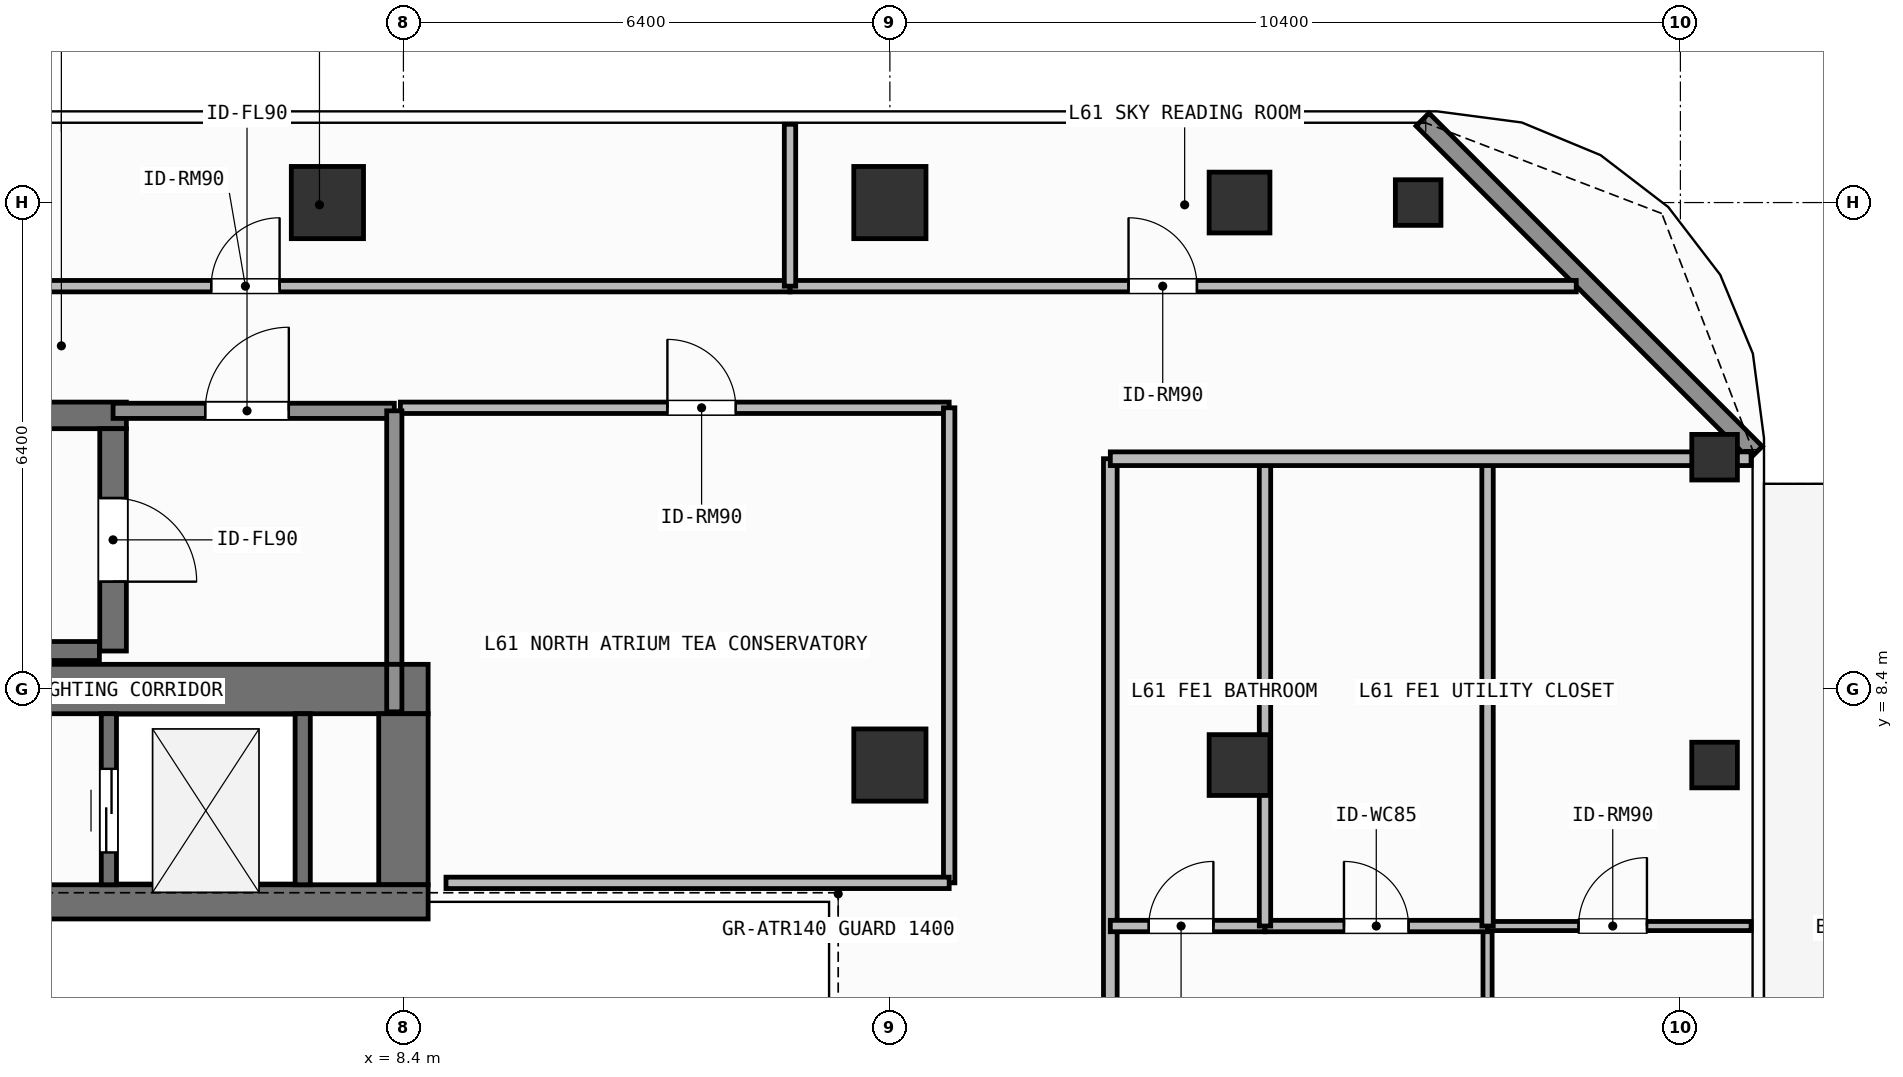
"""IFC4 building model, lengths in metres.
Left out: names, types, materials, properties, quantities, classifications, styles, units other than length and angle.
Written with IfcOpenShell. Run it as: python <this file> out.ifc"""

import sys

from ifc_helpers import new_model, si_unit, direction, frame, frame_2d, origin, origin_2d, place, context, subcontext, project, spatial, rectangle, hollow_rectangle, extrude, element, fill, save


model = new_model("IFC4")
c1 = context("Model", 3, precision=1e-05, world=origin(), true_north=direction((0.0, 1.0)))
c2 = subcontext(c1, "Body", "Model", "MODEL_VIEW")
j1 = project(units=[si_unit("LENGTHUNIT", "METRE"), si_unit("PLANEANGLEUNIT", "RADIAN")], contexts=[c1])
p1 = place(None, origin())
s1 = spatial("IfcSite", under=j1, at=p1, CompositionType="ELEMENT")
p2 = place(p1, origin())
s2 = spatial("IfcBuilding", under=s1, at=p2, CompositionType="ELEMENT")
p3 = place(p2, frame((0.0, 0.0, 250.8)))
s3 = spatial("IfcBuildingStorey", under=s2, at=p3, CompositionType="ELEMENT", Elevation=250.8)
p4 = place(p3, frame((-7.55, 8.4, 0.0), z_axis=(0.0, 0.0, 1.0), x_axis=(1.0, 0.0, 0.0)))
e1 = element("IfcWall", 1, at=p4, inside=s3, PredefinedType="SHEAR", context=c2, shape_type="SweptSolid", body=[
    extrude(rectangle(XDim=16.275, YDim=0.65, at=frame_2d((8.138, 0.0))), origin(), (0.0, 0.0, 1.0), 3.9),
])
p5 = place(p3, frame((8.4, 5.825, 0.0), z_axis=(0.0, 0.0, 1.0), x_axis=(0.0, 1.0, 0.0)))
e2 = element("IfcWall", 2, at=p5, inside=s3, PredefinedType="SHEAR", context=c2, shape_type="SweptSolid", body=[
    extrude(rectangle(XDim=2.25, YDim=0.65, at=frame_2d((1.125, 0.0))), origin(), (0.0, 0.0, 1.0), 3.9),
])
p6 = place(p3, frame((3.045, 5.6, 0.0), z_axis=(0.0, 0.0, 1.0), x_axis=(1.0, 0.0, 0.0)))
e3 = element("IfcWall", 3, at=p6, inside=s3, PredefinedType="SHEAR", context=c2, shape_type="SweptSolid", body=[
    extrude(rectangle(XDim=5.68, YDim=0.45, at=frame_2d((2.84, 0.0))), origin(), (0.0, 0.0, 1.0), 3.9),
])
p7 = place(p3, frame((-2.555, 12.0, 0.0), z_axis=(0.0, 0.0, 1.0), x_axis=(1.0, 0.0, 0.0)))
e4 = element("IfcWall", 4, at=p7, inside=s3, PredefinedType="SHEAR", context=c2, shape_type="SweptSolid", body=[
    extrude(rectangle(XDim=7.31, YDim=0.35, at=frame_2d((3.655, 0.0))), origin(), (0.0, 0.0, 1.0), 3.9),
])
p8 = place(p3, frame((-2.2, 8.9, 0.0), z_axis=(0.0, 0.0, 1.0), x_axis=(1.0, 0.0, 0.0)))
e5 = element("IfcWall", 5, at=p8, inside=s3, PredefinedType="SHEAR", context=c2, shape_type="SweptSolid", body=[
    extrude(rectangle(XDim=6.6, YDim=0.25, at=frame_2d((3.3, 0.0))), origin(), (0.0, 0.0, 1.0), 3.9),
])
p9 = place(p3, frame((4.58, 11.825, 0.0), z_axis=(0.0, 0.0, 1.0), x_axis=(0.0, -1.0, 0.0)))
e6 = element("IfcWall", 6, at=p9, inside=s3, PredefinedType="SHEAR", context=c2, shape_type="SweptSolid", body=[
    extrude(rectangle(XDim=2.925, YDim=0.35, at=frame_2d((1.462, 0.0))), origin(), (0.0, 0.0, 1.0), 3.9),
])
p10 = place(p9, frame((0.913, 0.0, 0.0)))
e7 = element("IfcOpeningElement", 7, at=p10, cuts=e6, PredefinedType="OPENING", context=c2, shape_type="SweptSolid", body=[
    extrude(rectangle(XDim=1.1, YDim=2.15, at=frame_2d((0.55, 1.075))), frame((0.0, 0.185, 0.0), z_axis=(0.0, -1.0, 0.0), x_axis=(1.0, 0.0, 0.0)), (0.0, 0.0, 1.0), 0.37),
])
for number, where, z_axis, x_axis in (
    (8, (7.4, 14.8, 0.0), (0.0, 0.0, 1.0), (1.0, 0.0, 0.0)),
    (9, (14.8, 14.8, 0.0), (0.0, 0.0, 1.0), (1.0, 0.0, 0.0)),
    (10, (14.8, 7.4, 0.0), (0.0, 0.0, 1.0), (1.0, 0.0, 0.0)),
):
    element("IfcColumn", number, at=place(p3, frame(where, z_axis=z_axis, x_axis=x_axis)), inside=s3, PredefinedType="COLUMN", context=c2, shape_type="SweptSolid", body=[
        extrude(rectangle(XDim=0.95, YDim=0.95, at=origin_2d()), origin(), (0.0, 0.0, 1.0), 3.9),
    ])
for number, where, z_axis, x_axis in (
    (11, (19.4, 7.4, 0.0), (0.0, 0.0, 1.0), (1.0, 0.0, 0.0)),
    (12, (19.4, 14.8, 0.0), (0.0, 0.0, 1.0), (1.0, 0.0, 0.0)),
):
    element("IfcColumn", number, at=place(p3, frame(where, z_axis=z_axis, x_axis=x_axis)), inside=s3, PredefinedType="COLUMN", context=c2, shape_type="SweptSolid", body=[
        extrude(hollow_rectangle(XDim=0.8, YDim=0.8, WallThickness=0.036, at=origin_2d()), origin(), (0.0, 0.0, 1.0), 3.9),
    ])
for number, where, z_axis, x_axis in (
    (13, (21.75, 14.8, 0.0), (0.0, 0.0, 1.0), (1.0, 0.0, 0.0)),
    (14, (25.65, 11.45, 0.0), (0.0, 0.0, 1.0), (1.0, 0.0, 0.0)),
    (15, (25.65, 7.4, 0.0), (0.0, 0.0, 1.0), (1.0, 0.0, 0.0)),
):
    element("IfcColumn", number, at=place(p3, frame(where, z_axis=z_axis, x_axis=x_axis)), inside=s3, PredefinedType="COLUMN", context=c2, shape_type="SweptSolid", body=[
        extrude(hollow_rectangle(XDim=0.6, YDim=0.6, WallThickness=0.028, at=origin_2d()), origin(), (0.0, 0.0, 1.0), 3.9),
    ])
p11 = place(p3, frame((21.808, 15.892, 0.0), z_axis=(0.0, 0.0, 1.0), x_axis=(0.707106781187, -0.707106781187, 0.0)))
e16 = element("IfcWall", 16, at=p11, inside=s3, PredefinedType="SOLIDWALL", context=c2, shape_type="SweptSolid", body=[
    extrude(rectangle(XDim=6.201, YDim=0.24, at=frame_2d((3.101, 0.0))), origin(), (0.0, 0.0, 1.0), 3.62),
])
p12 = place(p3, frame((4.525, 5.825, 0.0), z_axis=(0.0, 0.0, 1.0), x_axis=(0.0, 1.0, 0.0)))
e17 = element("IfcWall", 17, at=p12, inside=s3, PredefinedType="SHEAR", context=c2, shape_type="SweptSolid", body=[
    extrude(rectangle(XDim=2.25, YDim=0.2, at=frame_2d((1.125, 0.0))), origin(), (0.0, 0.0, 1.0), 3.62),
])
p13 = place(p12, frame((0.425, 0.0, 0.0)))
e18 = element("IfcOpeningElement", 18, at=p13, cuts=e17, PredefinedType="OPENING", context=c2, shape_type="SweptSolid", body=[
    extrude(rectangle(XDim=1.1, YDim=2.2, at=frame_2d((0.55, 1.1))), frame((0.0, 0.11, 0.0), z_axis=(0.0, -1.0, 0.0), x_axis=(1.0, 0.0, 0.0)), (0.0, 0.0, 1.0), 0.22),
])
p14 = place(p3, frame((7.075, 5.825, 0.0), z_axis=(0.0, 0.0, 1.0), x_axis=(0.0, 1.0, 0.0)))
e19 = element("IfcWall", 19, at=p14, inside=s3, PredefinedType="SHEAR", context=c2, shape_type="SweptSolid", body=[
    extrude(rectangle(XDim=2.25, YDim=0.2, at=frame_2d((1.125, 0.0))), origin(), (0.0, 0.0, 1.0), 3.62),
])
p15 = place(p3, frame((4.58, 12.06, 0.0), z_axis=(0.0, 0.0, 1.0), x_axis=(1.0, 0.0, 0.0)))
e20 = element("IfcWall", 20, at=p15, inside=s3, PredefinedType="SOLIDWALL", context=c2, shape_type="SweptSolid", body=[
    extrude(rectangle(XDim=3.7, YDim=0.2, at=frame_2d((1.85, 0.0))), origin(), (0.0, 0.0, 1.0), 3.62),
])
p16 = place(p15, frame((1.212, 0.0, 0.0)))
e21 = element("IfcOpeningElement", 21, at=p16, cuts=e20, PredefinedType="OPENING", context=c2, shape_type="SweptSolid", body=[
    extrude(rectangle(XDim=1.1, YDim=2.15, at=frame_2d((0.55, 1.075))), frame((0.0, 0.11, 0.0), z_axis=(0.0, -1.0, 0.0), x_axis=(1.0, 0.0, 0.0)), (0.0, 0.0, 1.0), 0.22),
])
p17 = place(p3, frame((8.36, 12.1, 0.0), z_axis=(0.0, 0.0, 1.0), x_axis=(1.0, 0.0, 0.0)))
e22 = element("IfcWall", 22, at=p17, inside=s3, PredefinedType="PARTITIONING", context=c2, shape_type="SweptSolid", body=[
    extrude(rectangle(XDim=7.22, YDim=0.15, at=frame_2d((3.61, 0.0))), origin(), (0.0, 0.0, 1.0), 3.62),
])
p18 = place(p17, frame((3.513, 0.0, 0.0)))
e23 = element("IfcOpeningElement", 23, at=p18, cuts=e22, PredefinedType="OPENING", context=c2, shape_type="SweptSolid", body=[
    extrude(rectangle(XDim=0.9, YDim=2.1, at=frame_2d((0.45, 1.05))), frame((0.0, 0.085, 0.0), z_axis=(0.0, -1.0, 0.0), x_axis=(1.0, 0.0, 0.0)), (0.0, 0.0, 1.0), 0.17),
])
p19 = place(p3, frame((1.105, 13.7, 0.0), z_axis=(0.0, 0.0, 1.0), x_axis=(1.0, 0.0, 0.0)))
e24 = element("IfcWall", 24, at=p19, inside=s3, PredefinedType="PARTITIONING", context=c2, shape_type="SweptSolid", body=[
    extrude(rectangle(XDim=12.381, YDim=0.15, at=frame_2d((6.19, 0.0))), origin(), (0.0, 0.0, 1.0), 3.62),
])
p20 = place(p19, frame((4.766, 0.0, 0.0)))
e25 = element("IfcOpeningElement", 25, at=p20, cuts=e24, PredefinedType="OPENING", context=c2, shape_type="SweptSolid", body=[
    extrude(rectangle(XDim=0.9, YDim=2.1, at=frame_2d((0.45, 1.05))), frame((0.0, 0.085, 0.0), z_axis=(0.0, -1.0, 0.0), x_axis=(1.0, 0.0, 0.0)), (0.0, 0.0, 1.0), 0.17),
])
p21 = place(p3, frame((13.486, 13.7, 0.0), z_axis=(0.0, 0.0, 1.0), x_axis=(1.0, 0.0, 0.0)))
e26 = element("IfcWall", 26, at=p21, inside=s3, PredefinedType="PARTITIONING", context=c2, shape_type="SweptSolid", body=[
    extrude(rectangle(XDim=10.344, YDim=0.15, at=frame_2d((5.172, 0.0))), origin(), (0.0, 0.0, 1.0), 3.62),
])
p22 = place(p21, frame((4.454, 0.0, 0.0)))
e27 = element("IfcOpeningElement", 27, at=p22, cuts=e26, PredefinedType="OPENING", context=c2, shape_type="SweptSolid", body=[
    extrude(rectangle(XDim=0.9, YDim=2.1, at=frame_2d((0.45, 1.05))), frame((0.0, 0.085, 0.0), z_axis=(0.0, -1.0, 0.0), x_axis=(1.0, 0.0, 0.0)), (0.0, 0.0, 1.0), 0.17),
])
p23 = place(p3, frame((17.7, -12.12, 0.0), z_axis=(0.0, 0.0, 1.0), x_axis=(0.0, 1.0, 0.0)))
e28 = element("IfcWall", 28, at=p23, inside=s3, PredefinedType="PARTITIONING", context=c2, shape_type="SweptSolid", body=[
    extrude(rectangle(XDim=23.55, YDim=0.18, at=frame_2d((11.775, 0.0))), origin(), (0.0, 0.0, 1.0), 3.62),
])
p24 = place(p23, frame((11.454, 0.0, 0.0)))
e29 = element("IfcOpeningElement", 29, at=p24, cuts=e28, PredefinedType="OPENING", context=c2, shape_type="SweptSolid", body=[
    extrude(rectangle(XDim=1.0, YDim=2.2, at=frame_2d((0.5, 1.1))), frame((0.0, 0.1, 0.0), z_axis=(0.0, -1.0, 0.0), x_axis=(1.0, 0.0, 0.0)), (0.0, 0.0, 1.0), 0.2),
])
p25 = place(p3, frame((22.663, -5.416, 0.0), z_axis=(0.0, 0.0, 1.0), x_axis=(0.0, 1.0, 0.0)))
e30 = element("IfcWall", 30, at=p25, inside=s3, PredefinedType="PARTITIONING", context=c2, shape_type="SweptSolid", body=[
    extrude(rectangle(XDim=10.698, YDim=0.12, at=frame_2d((5.349, 0.0))), origin(), (0.0, 0.0, 1.0), 3.62),
])
p26 = place(p25, frame((4.81, 0.0, 0.0)))
e31 = element("IfcOpeningElement", 31, at=p26, cuts=e30, PredefinedType="OPENING", context=c2, shape_type="SweptSolid", body=[
    extrude(rectangle(XDim=0.9, YDim=2.1, at=frame_2d((0.45, 1.05))), frame((0.0, 0.07, 0.0), z_axis=(0.0, -1.0, 0.0), x_axis=(1.0, 0.0, 0.0)), (0.0, 0.0, 1.0), 0.14),
])
p27 = place(p3, frame((17.7, 5.282, 0.0), z_axis=(0.0, 0.0, 1.0), x_axis=(1.0, 0.0, 0.0)))
e32 = element("IfcWall", 32, at=p27, inside=s3, PredefinedType="PARTITIONING", context=c2, shape_type="SweptSolid", body=[
    extrude(rectangle(XDim=2.035, YDim=0.15, at=frame_2d((1.018, 0.0))), origin(), (0.0, 0.0, 1.0), 3.62),
])
p28 = place(p27, frame((0.506, 0.0, 0.0)))
e33 = element("IfcOpeningElement", 33, at=p28, cuts=e32, PredefinedType="OPENING", context=c2, shape_type="SweptSolid", body=[
    extrude(rectangle(XDim=0.85, YDim=2.1, at=frame_2d((0.425, 1.05))), frame((0.0, 0.085, 0.0), z_axis=(0.0, -1.0, 0.0), x_axis=(1.0, 0.0, 0.0)), (0.0, 0.0, 1.0), 0.17),
])
p29 = place(p3, frame((19.735, 5.282, 0.0), z_axis=(0.0, 0.0, 1.0), x_axis=(1.0, 0.0, 0.0)))
e34 = element("IfcWall", 34, at=p29, inside=s3, PredefinedType="PARTITIONING", context=c2, shape_type="SweptSolid", body=[
    extrude(rectangle(XDim=2.928, YDim=0.15, at=frame_2d((1.464, 0.0))), origin(), (0.0, 0.0, 1.0), 3.62),
])
p30 = place(p29, frame((1.039, 0.0, 0.0)))
e35 = element("IfcOpeningElement", 35, at=p30, cuts=e34, PredefinedType="OPENING", context=c2, shape_type="SweptSolid", body=[
    extrude(rectangle(XDim=0.85, YDim=2.1, at=frame_2d((0.425, 1.05))), frame((0.0, 0.085, 0.0), z_axis=(0.0, -1.0, 0.0), x_axis=(1.0, 0.0, 0.0)), (0.0, 0.0, 1.0), 0.17),
])
p31 = place(p3, frame((22.663, 5.282, 0.0), z_axis=(0.0, 0.0, 1.0), x_axis=(1.0, 0.0, 0.0)))
e36 = element("IfcWall", 36, at=p31, inside=s3, PredefinedType="PARTITIONING", context=c2, shape_type="SweptSolid", body=[
    extrude(rectangle(XDim=3.467, YDim=0.12, at=frame_2d((1.733, 0.0))), origin(), (0.0, 0.0, 1.0), 3.62),
])
p32 = place(p31, frame((1.197, 0.0, 0.0)))
e37 = element("IfcOpeningElement", 37, at=p32, cuts=e36, PredefinedType="OPENING", context=c2, shape_type="SweptSolid", body=[
    extrude(rectangle(XDim=0.9, YDim=2.1, at=frame_2d((0.45, 1.05))), frame((0.0, 0.07, 0.0), z_axis=(0.0, -1.0, 0.0), x_axis=(1.0, 0.0, 0.0)), (0.0, 0.0, 1.0), 0.14),
])
p33 = place(p3, frame((8.28, 8.725, 0.0), z_axis=(0.0, 0.0, 1.0), x_axis=(0.0, 1.0, 0.0)))
e38 = element("IfcWall", 38, at=p33, inside=s3, PredefinedType="SOLIDWALL", context=c2, shape_type="SweptSolid", body=[
    extrude(rectangle(XDim=3.335, YDim=0.2, at=frame_2d((1.667, 0.0))), origin(), (0.0, 0.0, 1.0), 3.62),
])
p34 = place(p3, frame((8.28, 8.1, 0.0), z_axis=(0.0, 0.0, 1.0), x_axis=(0.0, 1.0, 0.0)))
e39 = element("IfcWall", 39, at=p34, inside=s3, PredefinedType="SOLIDWALL", context=c2, shape_type="SweptSolid", body=[
    extrude(rectangle(XDim=0.625, YDim=0.2, at=frame_2d((0.312, 0.0))), origin(), (0.0, 0.0, 1.0), 3.62),
])
p35 = place(p3, frame((15.58, 5.85, 0.0), z_axis=(0.0, 0.0, 1.0), x_axis=(0.0, 1.0, 0.0)))
e40 = element("IfcWall", 40, at=p35, inside=s3, PredefinedType="PARTITIONING", context=c2, shape_type="SweptSolid", body=[
    extrude(rectangle(XDim=6.25, YDim=0.15, at=frame_2d((3.125, 0.0))), origin(), (0.0, 0.0, 1.0), 3.62),
])
p36 = place(p3, frame((8.96, 5.85, 0.0), z_axis=(0.0, 0.0, 1.0), x_axis=(1.0, 0.0, 0.0)))
e41 = element("IfcWall", 41, at=p36, inside=s3, PredefinedType="PARTITIONING", context=c2, shape_type="SweptSolid", body=[
    extrude(rectangle(XDim=6.62, YDim=0.15, at=frame_2d((3.31, 0.0))), origin(), (0.0, 0.0, 1.0), 3.62),
])
p37 = place(p3, frame((13.486, 13.7, 0.0), z_axis=(0.0, 0.0, 1.0), x_axis=(0.0, 1.0, 0.0)))
e42 = element("IfcWall", 42, at=p37, inside=s3, PredefinedType="PARTITIONING", context=c2, shape_type="SweptSolid", body=[
    extrude(rectangle(XDim=2.13, YDim=0.15, at=frame_2d((1.065, 0.0))), origin(), (0.0, 0.0, 1.0), 3.62),
])
p38 = place(p3, frame((19.735, 5.282, 0.0), z_axis=(0.0, 0.0, 1.0), x_axis=(0.0, 1.0, 0.0)))
e43 = element("IfcWall", 43, at=p38, inside=s3, PredefinedType="PARTITIONING", context=c2, shape_type="SweptSolid", body=[
    extrude(rectangle(XDim=6.148, YDim=0.15, at=frame_2d((3.074, 0.0))), origin(), (0.0, 0.0, 1.0), 2.71),
])
p39 = place(p3, frame((22.663, 5.282, 0.0), z_axis=(0.0, 0.0, 1.0), x_axis=(0.0, 1.0, 0.0)))
e44 = element("IfcWall", 44, at=p39, inside=s3, PredefinedType="PARTITIONING", context=c2, shape_type="SweptSolid", body=[
    extrude(rectangle(XDim=6.148, YDim=0.15, at=frame_2d((3.074, 0.0))), origin(), (0.0, 0.0, 1.0), 3.62),
])
p40 = place(p3, frame((17.7, 11.43, 0.0), z_axis=(0.0, 0.0, 1.0), x_axis=(1.0, 0.0, 0.0)))
e45 = element("IfcWall", 45, at=p40, inside=s3, PredefinedType="PARTITIONING", context=c2, shape_type="SweptSolid", body=[
    extrude(rectangle(XDim=8.43, YDim=0.18, at=frame_2d((4.215, 0.0))), origin(), (0.0, 0.0, 1.0), 3.62),
])
p41 = place(p13, origin())
e46 = element("IfcDoor", 46, at=p41, inside=s3, OperationType="SLIDING_TO_LEFT", PredefinedType="DOOR", context=c2, shape_type="SweptSolid", body=[
    extrude(rectangle(XDim=1.1, YDim=2.2, at=frame_2d((0.55, 1.1))), frame((0.0, 0.025, 0.0), z_axis=(0.0, -1.0, 0.0), x_axis=(1.0, 0.0, 0.0)), (0.0, 0.0, 1.0), 0.05),
])
fill(e18, e46)
p42 = place(p10, origin())
e47 = element("IfcDoor", 47, at=p42, inside=s3, OperationType="SINGLE_SWING_RIGHT", PredefinedType="DOOR", context=c2, shape_type="SweptSolid", body=[
    extrude(rectangle(XDim=1.1, YDim=2.15, at=frame_2d((0.55, 1.075))), frame((0.0, 0.025, 0.0), z_axis=(0.0, -1.0, 0.0), x_axis=(1.0, 0.0, 0.0)), (0.0, 0.0, 1.0), 0.05),
])
fill(e7, e47)
p43 = place(p16, origin())
e48 = element("IfcDoor", 48, at=p43, inside=s3, OperationType="SINGLE_SWING_RIGHT", PredefinedType="DOOR", context=c2, shape_type="SweptSolid", body=[
    extrude(rectangle(XDim=1.1, YDim=2.15, at=frame_2d((0.55, 1.075))), frame((0.0, 0.025, 0.0), z_axis=(0.0, -1.0, 0.0), x_axis=(1.0, 0.0, 0.0)), (0.0, 0.0, 1.0), 0.05),
])
fill(e21, e48)
p44 = place(p18, origin())
e49 = element("IfcDoor", 49, at=p44, inside=s3, OperationType="SINGLE_SWING_LEFT", PredefinedType="DOOR", context=c2, shape_type="SweptSolid", body=[
    extrude(rectangle(XDim=0.9, YDim=2.1, at=frame_2d((0.45, 1.05))), frame((0.0, 0.025, 0.0), z_axis=(0.0, -1.0, 0.0), x_axis=(1.0, 0.0, 0.0)), (0.0, 0.0, 1.0), 0.05),
])
fill(e23, e49)
p45 = place(p20, origin())
e50 = element("IfcDoor", 50, at=p45, inside=s3, OperationType="SINGLE_SWING_RIGHT", PredefinedType="DOOR", context=c2, shape_type="SweptSolid", body=[
    extrude(rectangle(XDim=0.9, YDim=2.1, at=frame_2d((0.45, 1.05))), frame((0.0, 0.025, 0.0), z_axis=(0.0, -1.0, 0.0), x_axis=(1.0, 0.0, 0.0)), (0.0, 0.0, 1.0), 0.05),
])
fill(e25, e50)
p46 = place(p22, origin())
e51 = element("IfcDoor", 51, at=p46, inside=s3, OperationType="SINGLE_SWING_LEFT", PredefinedType="DOOR", context=c2, shape_type="SweptSolid", body=[
    extrude(rectangle(XDim=0.9, YDim=2.1, at=frame_2d((0.45, 1.05))), frame((0.0, 0.025, 0.0), z_axis=(0.0, -1.0, 0.0), x_axis=(1.0, 0.0, 0.0)), (0.0, 0.0, 1.0), 0.05),
])
fill(e27, e51)
p47 = place(p28, origin())
e52 = element("IfcDoor", 52, at=p47, inside=s3, OperationType="SINGLE_SWING_RIGHT", PredefinedType="DOOR", context=c2, shape_type="SweptSolid", body=[
    extrude(rectangle(XDim=0.85, YDim=2.1, at=frame_2d((0.425, 1.05))), frame((0.0, 0.025, 0.0), z_axis=(0.0, -1.0, 0.0), x_axis=(1.0, 0.0, 0.0)), (0.0, 0.0, 1.0), 0.05),
])
fill(e33, e52)
p48 = place(p30, origin())
e53 = element("IfcDoor", 53, at=p48, inside=s3, OperationType="SINGLE_SWING_LEFT", PredefinedType="DOOR", context=c2, shape_type="SweptSolid", body=[
    extrude(rectangle(XDim=0.85, YDim=2.1, at=frame_2d((0.425, 1.05))), frame((0.0, 0.025, 0.0), z_axis=(0.0, -1.0, 0.0), x_axis=(1.0, 0.0, 0.0)), (0.0, 0.0, 1.0), 0.05),
])
fill(e35, e53)
p49 = place(p32, origin())
e54 = element("IfcDoor", 54, at=p49, inside=s3, OperationType="SINGLE_SWING_RIGHT", PredefinedType="DOOR", context=c2, shape_type="SweptSolid", body=[
    extrude(rectangle(XDim=0.9, YDim=2.1, at=frame_2d((0.45, 1.05))), frame((0.0, 0.025, 0.0), z_axis=(0.0, -1.0, 0.0), x_axis=(1.0, 0.0, 0.0)), (0.0, 0.0, 1.0), 0.05),
])
fill(e37, e54)
save(model, sys.argv[1])
